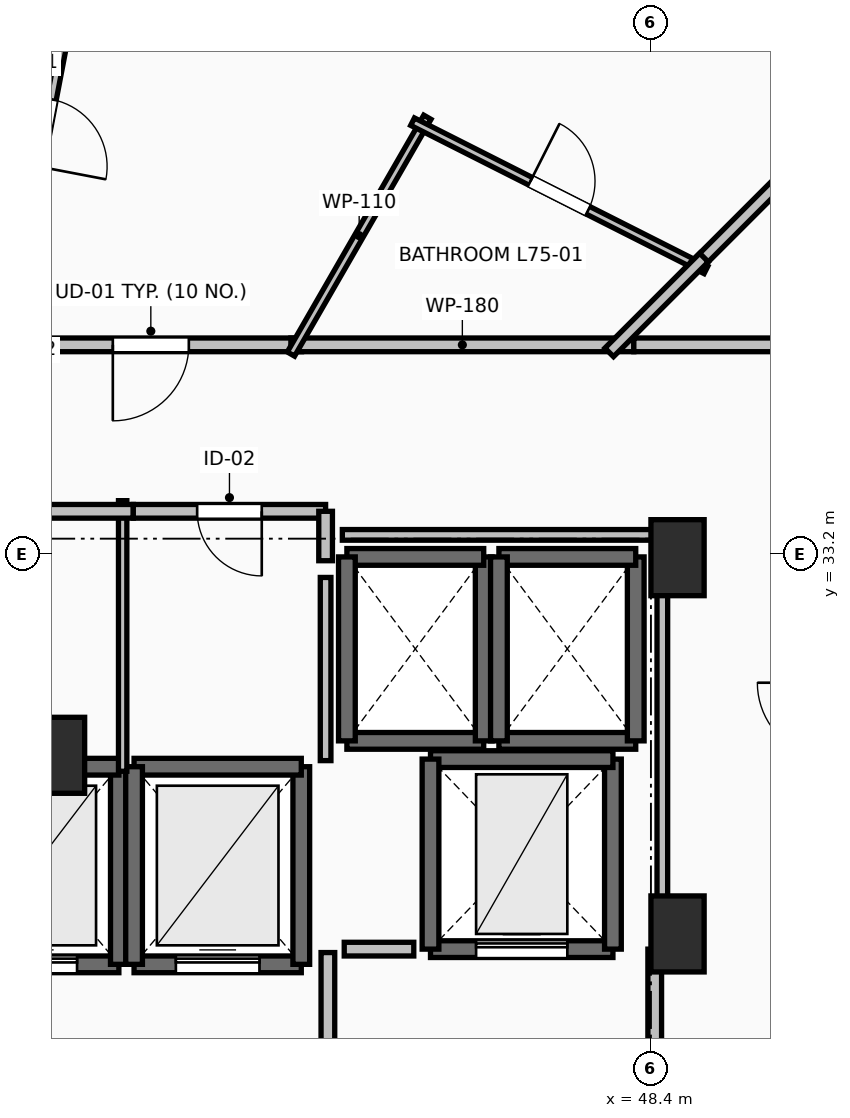
"""IFC4 building model, lengths in metres.
Left out: names, types, materials, properties, quantities, classifications, styles, units other than length and angle.
Written with IfcOpenShell. Run it as: python <this file> out.ifc"""

import sys

from ifc_helpers import new_model, si_unit, direction, frame, frame_2d, origin, origin_2d, place, context, subcontext, project, spatial, rectangle, extrude, element, fill, save


model = new_model("IFC4")
c1 = context("Model", 3, precision=1e-05, world=origin(), true_north=direction((0.0, 1.0)))
c2 = subcontext(c1, "Body", "Model", "MODEL_VIEW")
j1 = project(units=[si_unit("LENGTHUNIT", "METRE"), si_unit("PLANEANGLEUNIT", "RADIAN")], contexts=[c1])
p1 = place(None, origin())
s1 = spatial("IfcSite", under=j1, at=p1, CompositionType="ELEMENT")
p2 = place(p1, origin())
s2 = spatial("IfcBuilding", under=s1, at=p2, CompositionType="ELEMENT")
p3 = place(p2, frame((0.0, 0.0, 276.85)))
s3 = spatial("IfcBuildingStorey", under=s2, at=p3, CompositionType="ELEMENT", Elevation=276.85)
for number, where, z_axis, x_axis in (
    (1, (48.75, 33.15, 0.0), (0.0, 0.0, 1.0), (1.0, 0.0, 0.0)),
    (2, (48.75, 28.2, 0.0), (0.0, 0.0, 1.0), (1.0, 0.0, 0.0)),
    (3, (40.6, 30.55, 0.0), (0.0, 0.0, 1.0), (1.0, 0.0, 0.0)),
):
    element("IfcColumn", number, at=place(p3, frame(where, z_axis=z_axis, x_axis=x_axis)), inside=s3, PredefinedType="PILASTER", context=c2, shape_type="SweptSolid", body=[
        extrude(rectangle(XDim=0.7, YDim=1.0, at=origin_2d()), origin(), (0.0, 0.0, 1.0), 3.55),
    ])
p4 = place(p3, frame((39.2, 27.8, 0.0), z_axis=(0.0, 0.0, 1.0), x_axis=(1.0, 0.0, 0.0)))
e4 = element("IfcWall", 4, at=p4, inside=s3, PredefinedType="SOLIDWALL", context=c2, shape_type="SweptSolid", body=[
    extrude(rectangle(XDim=2.2, YDim=0.22, at=frame_2d((1.1, 0.0))), origin(), (0.0, 0.0, 1.0), 3.19),
])
p5 = place(p4, frame((0.55, 0.0, 0.0)))
e5 = element("IfcOpeningElement", 5, at=p5, cuts=e4, PredefinedType="OPENING", context=c2, shape_type="SweptSolid", body=[
    extrude(rectangle(XDim=1.1, YDim=2.2, at=frame_2d((0.55, 1.1))), frame((0.0, 0.125, 0.0), z_axis=(0.0, -1.0, 0.0), x_axis=(1.0, 0.0, 0.0)), (0.0, 0.0, 1.0), 0.25),
])
p6 = place(p3, frame((41.4, 27.8, 0.0), z_axis=(0.0, 0.0, 1.0), x_axis=(0.0, 1.0, 0.0)))
e6 = element("IfcWall", 6, at=p6, inside=s3, PredefinedType="SOLIDWALL", context=c2, shape_type="SweptSolid", body=[
    extrude(rectangle(XDim=2.6, YDim=0.22, at=frame_2d((1.3, 0.0))), origin(), (0.0, 0.0, 1.0), 3.19),
])
p7 = place(p3, frame((41.4, 30.4, 0.0), z_axis=(0.0, 0.0, 1.0), x_axis=(-1.0, 0.0, 0.0)))
e7 = element("IfcWall", 7, at=p7, inside=s3, PredefinedType="SOLIDWALL", context=c2, shape_type="SweptSolid", body=[
    extrude(rectangle(XDim=2.2, YDim=0.22, at=frame_2d((1.1, 0.0))), origin(), (0.0, 0.0, 1.0), 3.19),
])
p8 = place(p3, frame((41.6, 27.8, 0.0), z_axis=(0.0, 0.0, 1.0), x_axis=(1.0, 0.0, 0.0)))
e8 = element("IfcWall", 8, at=p8, inside=s3, PredefinedType="SOLIDWALL", context=c2, shape_type="SweptSolid", body=[
    extrude(rectangle(XDim=2.2, YDim=0.22, at=frame_2d((1.1, 0.0))), origin(), (0.0, 0.0, 1.0), 3.19),
])
p9 = place(p8, frame((0.55, 0.0, 0.0)))
e9 = element("IfcOpeningElement", 9, at=p9, cuts=e8, PredefinedType="OPENING", context=c2, shape_type="SweptSolid", body=[
    extrude(rectangle(XDim=1.1, YDim=2.2, at=frame_2d((0.55, 1.1))), frame((0.0, 0.125, 0.0), z_axis=(0.0, -1.0, 0.0), x_axis=(1.0, 0.0, 0.0)), (0.0, 0.0, 1.0), 0.25),
])
p10 = place(p3, frame((43.8, 27.8, 0.0), z_axis=(0.0, 0.0, 1.0), x_axis=(0.0, 1.0, 0.0)))
e10 = element("IfcWall", 10, at=p10, inside=s3, PredefinedType="SOLIDWALL", context=c2, shape_type="SweptSolid", body=[
    extrude(rectangle(XDim=2.6, YDim=0.22, at=frame_2d((1.3, 0.0))), origin(), (0.0, 0.0, 1.0), 3.19),
])
p11 = place(p3, frame((43.8, 30.4, 0.0), z_axis=(0.0, 0.0, 1.0), x_axis=(-1.0, 0.0, 0.0)))
e11 = element("IfcWall", 11, at=p11, inside=s3, PredefinedType="SOLIDWALL", context=c2, shape_type="SweptSolid", body=[
    extrude(rectangle(XDim=2.2, YDim=0.22, at=frame_2d((1.1, 0.0))), origin(), (0.0, 0.0, 1.0), 3.19),
])
p12 = place(p3, frame((41.6, 30.4, 0.0), z_axis=(0.0, 0.0, 1.0), x_axis=(0.0, -1.0, 0.0)))
e12 = element("IfcWall", 12, at=p12, inside=s3, PredefinedType="SOLIDWALL", context=c2, shape_type="SweptSolid", body=[
    extrude(rectangle(XDim=2.6, YDim=0.22, at=frame_2d((1.3, 0.0))), origin(), (0.0, 0.0, 1.0), 3.19),
])
p13 = place(p3, frame((44.4, 30.74, 0.0), z_axis=(0.0, 0.0, 1.0), x_axis=(1.0, 0.0, 0.0)))
e13 = element("IfcWall", 13, at=p13, inside=s3, PredefinedType="SOLIDWALL", context=c2, shape_type="SweptSolid", body=[
    extrude(rectangle(XDim=1.8, YDim=0.22, at=frame_2d((0.9, 0.0))), origin(), (0.0, 0.0, 1.0), 3.19),
])
p14 = place(p3, frame((46.2, 30.74, 0.0), z_axis=(0.0, 0.0, 1.0), x_axis=(0.0, 1.0, 0.0)))
e14 = element("IfcWall", 14, at=p14, inside=s3, PredefinedType="SOLIDWALL", context=c2, shape_type="SweptSolid", body=[
    extrude(rectangle(XDim=2.42, YDim=0.22, at=frame_2d((1.21, 0.0))), origin(), (0.0, 0.0, 1.0), 3.19),
])
p15 = place(p3, frame((46.2, 33.16, 0.0), z_axis=(0.0, 0.0, 1.0), x_axis=(-1.0, 0.0, 0.0)))
e15 = element("IfcWall", 15, at=p15, inside=s3, PredefinedType="SOLIDWALL", context=c2, shape_type="SweptSolid", body=[
    extrude(rectangle(XDim=1.8, YDim=0.22, at=frame_2d((0.9, 0.0))), origin(), (0.0, 0.0, 1.0), 3.19),
])
p16 = place(p3, frame((44.4, 33.16, 0.0), z_axis=(0.0, 0.0, 1.0), x_axis=(0.0, -1.0, 0.0)))
e16 = element("IfcWall", 16, at=p16, inside=s3, PredefinedType="SOLIDWALL", context=c2, shape_type="SweptSolid", body=[
    extrude(rectangle(XDim=2.42, YDim=0.22, at=frame_2d((1.21, 0.0))), origin(), (0.0, 0.0, 1.0), 3.19),
])
p17 = place(p3, frame((46.4, 30.74, 0.0), z_axis=(0.0, 0.0, 1.0), x_axis=(1.0, 0.0, 0.0)))
e17 = element("IfcWall", 17, at=p17, inside=s3, PredefinedType="SOLIDWALL", context=c2, shape_type="SweptSolid", body=[
    extrude(rectangle(XDim=1.8, YDim=0.22, at=frame_2d((0.9, 0.0))), origin(), (0.0, 0.0, 1.0), 3.19),
])
p18 = place(p3, frame((48.2, 30.74, 0.0), z_axis=(0.0, 0.0, 1.0), x_axis=(0.0, 1.0, 0.0)))
e18 = element("IfcWall", 18, at=p18, inside=s3, PredefinedType="SOLIDWALL", context=c2, shape_type="SweptSolid", body=[
    extrude(rectangle(XDim=2.42, YDim=0.22, at=frame_2d((1.21, 0.0))), origin(), (0.0, 0.0, 1.0), 3.19),
])
p19 = place(p3, frame((48.2, 33.16, 0.0), z_axis=(0.0, 0.0, 1.0), x_axis=(-1.0, 0.0, 0.0)))
e19 = element("IfcWall", 19, at=p19, inside=s3, PredefinedType="SOLIDWALL", context=c2, shape_type="SweptSolid", body=[
    extrude(rectangle(XDim=1.8, YDim=0.22, at=frame_2d((0.9, 0.0))), origin(), (0.0, 0.0, 1.0), 3.19),
])
p20 = place(p3, frame((46.4, 33.16, 0.0), z_axis=(0.0, 0.0, 1.0), x_axis=(0.0, -1.0, 0.0)))
e20 = element("IfcWall", 20, at=p20, inside=s3, PredefinedType="SOLIDWALL", context=c2, shape_type="SweptSolid", body=[
    extrude(rectangle(XDim=2.42, YDim=0.22, at=frame_2d((1.21, 0.0))), origin(), (0.0, 0.0, 1.0), 3.19),
])
p21 = place(p3, frame((45.5, 28.0, 0.0), z_axis=(0.0, 0.0, 1.0), x_axis=(1.0, 0.0, 0.0)))
e21 = element("IfcWall", 21, at=p21, inside=s3, PredefinedType="SHEAR", context=c2, shape_type="SweptSolid", body=[
    extrude(rectangle(XDim=2.4, YDim=0.22, at=frame_2d((1.2, 0.0))), origin(), (0.0, 0.0, 1.0), 3.19),
])
p22 = place(p21, frame((0.6, 0.0, 0.0)))
e22 = element("IfcOpeningElement", 22, at=p22, cuts=e21, PredefinedType="OPENING", context=c2, shape_type="SweptSolid", body=[
    extrude(rectangle(XDim=1.2, YDim=2.2, at=frame_2d((0.6, 1.1))), frame((0.0, 0.125, 0.0), z_axis=(0.0, -1.0, 0.0), x_axis=(1.0, 0.0, 0.0)), (0.0, 0.0, 1.0), 0.25),
])
p23 = place(p3, frame((47.9, 28.0, 0.0), z_axis=(0.0, 0.0, 1.0), x_axis=(0.0, 1.0, 0.0)))
e23 = element("IfcWall", 23, at=p23, inside=s3, PredefinedType="SHEAR", context=c2, shape_type="SweptSolid", body=[
    extrude(rectangle(XDim=2.5, YDim=0.22, at=frame_2d((1.25, 0.0))), origin(), (0.0, 0.0, 1.0), 3.19),
])
p24 = place(p3, frame((47.9, 30.5, 0.0), z_axis=(0.0, 0.0, 1.0), x_axis=(-1.0, 0.0, 0.0)))
e24 = element("IfcWall", 24, at=p24, inside=s3, PredefinedType="SHEAR", context=c2, shape_type="SweptSolid", body=[
    extrude(rectangle(XDim=2.4, YDim=0.22, at=frame_2d((1.2, 0.0))), origin(), (0.0, 0.0, 1.0), 3.19),
])
p25 = place(p3, frame((45.5, 30.5, 0.0), z_axis=(0.0, 0.0, 1.0), x_axis=(0.0, -1.0, 0.0)))
e25 = element("IfcWall", 25, at=p25, inside=s3, PredefinedType="SHEAR", context=c2, shape_type="SweptSolid", body=[
    extrude(rectangle(XDim=2.5, YDim=0.22, at=frame_2d((1.25, 0.0))), origin(), (0.0, 0.0, 1.0), 3.19),
])
p26 = place(p3, frame((44.15, 27.955, 0.0), z_axis=(0.0, 0.0, 1.0), x_axis=(0.0, -1.0, 0.0)))
e26 = element("IfcWall", 26, at=p26, inside=s3, PredefinedType="PARTITIONING", context=c2, shape_type="SweptSolid", body=[
    extrude(rectangle(XDim=3.91, YDim=0.18, at=frame_2d((1.955, 0.0))), origin(), (0.0, 0.0, 1.0), 3.19),
])
p27 = place(p26, frame((1.355, 0.0, 0.0)))
e27 = element("IfcOpeningElement", 27, at=p27, cuts=e26, PredefinedType="OPENING", context=c2, shape_type="SweptSolid", body=[
    extrude(rectangle(XDim=1.2, YDim=2.15, at=frame_2d((0.6, 1.075))), frame((0.0, 0.105, 0.0), z_axis=(0.0, -1.0, 0.0), x_axis=(1.0, 0.0, 0.0)), (0.0, 0.0, 1.0), 0.21),
])
p28 = place(p3, frame((48.45, 23.95, 0.0), z_axis=(0.0, 0.0, 1.0), x_axis=(0.0, 1.0, 0.0)))
e28 = element("IfcWall", 28, at=p28, inside=s3, PredefinedType="PARTITIONING", context=c2, shape_type="SweptSolid", body=[
    extrude(rectangle(XDim=4.05, YDim=0.18, at=frame_2d((2.025, 0.0))), origin(), (0.0, 0.0, 1.0), 3.19),
])
p29 = place(p28, frame((1.425, 0.0, 0.0)))
e29 = element("IfcOpeningElement", 29, at=p29, cuts=e28, PredefinedType="OPENING", context=c2, shape_type="SweptSolid", body=[
    extrude(rectangle(XDim=1.2, YDim=2.15, at=frame_2d((0.6, 1.075))), frame((0.0, 0.105, 0.0), z_axis=(0.0, -1.0, 0.0), x_axis=(1.0, 0.0, 0.0)), (0.0, 0.0, 1.0), 0.21),
])
p30 = place(p3, frame((41.45, 30.34, 0.0), z_axis=(0.0, 0.0, 1.0), x_axis=(0.0, 1.0, 0.0)))
e30 = element("IfcWall", 30, at=p30, inside=s3, PredefinedType="PARTITIONING", context=c2, shape_type="SweptSolid", body=[
    extrude(rectangle(XDim=3.56, YDim=0.11, at=frame_2d((1.78, 0.0))), origin(), (0.0, 0.0, 1.0), 3.19),
])
p31 = place(p3, frame((41.59, 33.76, 0.0), z_axis=(0.0, 0.0, 1.0), x_axis=(-1.0, 0.0, 0.0)))
e31 = element("IfcWall", 31, at=p31, inside=s3, PredefinedType="PARTITIONING", context=c2, shape_type="SweptSolid", body=[
    extrude(rectangle(XDim=3.44, YDim=0.18, at=frame_2d((1.72, 0.0))), origin(), (0.0, 0.0, 1.0), 3.19),
])
p32 = place(p31, frame((1.295, 0.0, 0.0)))
e32 = element("IfcOpeningElement", 32, at=p32, cuts=e31, PredefinedType="OPENING", context=c2, shape_type="SweptSolid", body=[
    extrude(rectangle(XDim=0.85, YDim=2.1, at=frame_2d((0.425, 1.05))), frame((0.0, 0.105, 0.0), z_axis=(0.0, -1.0, 0.0), x_axis=(1.0, 0.0, 0.0)), (0.0, 0.0, 1.0), 0.21),
])
p33 = place(p3, frame((44.12, 33.76, 0.0), z_axis=(0.0, 0.0, 1.0), x_axis=(-1.0, 0.0, 0.0)))
e33 = element("IfcWall", 33, at=p33, inside=s3, PredefinedType="PARTITIONING", context=c2, shape_type="SweptSolid", body=[
    extrude(rectangle(XDim=2.53, YDim=0.18, at=frame_2d((1.265, 0.0))), origin(), (0.0, 0.0, 1.0), 3.19),
])
p34 = place(p33, frame((0.84, 0.0, 0.0)))
e34 = element("IfcOpeningElement", 34, at=p34, cuts=e33, PredefinedType="OPENING", context=c2, shape_type="SweptSolid", body=[
    extrude(rectangle(XDim=0.85, YDim=2.1, at=frame_2d((0.425, 1.05))), frame((0.0, 0.105, 0.0), z_axis=(0.0, -1.0, 0.0), x_axis=(1.0, 0.0, 0.0)), (0.0, 0.0, 1.0), 0.21),
])
p35 = place(p3, frame((44.12, 33.11, 0.0), z_axis=(0.0, 0.0, 1.0), x_axis=(0.0, 1.0, 0.0)))
e35 = element("IfcWall", 35, at=p35, inside=s3, PredefinedType="PARTITIONING", context=c2, shape_type="SweptSolid", body=[
    extrude(rectangle(XDim=0.65, YDim=0.18, at=frame_2d((0.325, 0.0))), origin(), (0.0, 0.0, 1.0), 3.19),
])
p36 = place(p3, frame((43.803, 35.95, 0.0), z_axis=(0.0, 0.0, 1.0), x_axis=(-1.0, 0.0, 0.0)))
e36 = element("IfcWall", 36, at=p36, inside=s3, PredefinedType="PARTITIONING", context=c2, shape_type="SweptSolid", body=[
    extrude(rectangle(XDim=3.965, YDim=0.18, at=frame_2d((1.982, 0.0))), origin(), (0.0, 0.0, 1.0), 3.19),
])
p37 = place(p36, frame((1.482, 0.0, 0.0)))
e37 = element("IfcOpeningElement", 37, at=p37, cuts=e36, PredefinedType="OPENING", context=c2, shape_type="SweptSolid", body=[
    extrude(rectangle(XDim=1.0, YDim=2.15, at=frame_2d((0.5, 1.075))), frame((0.0, 0.105, 0.0), z_axis=(0.0, -1.0, 0.0), x_axis=(1.0, 0.0, 0.0)), (0.0, 0.0, 1.0), 0.21),
])
p38 = place(p3, frame((48.175, 35.95, 0.0), z_axis=(0.0, 0.0, 1.0), x_axis=(-1.0, 0.0, 0.0)))
e38 = element("IfcWall", 38, at=p38, inside=s3, PredefinedType="PARTITIONING", context=c2, shape_type="SweptSolid", body=[
    extrude(rectangle(XDim=4.512, YDim=0.18, at=frame_2d((2.256, 0.0))), origin(), (0.0, 0.0, 1.0), 2.382),
])
p39 = place(p3, frame((50.8, 35.95, 0.0), z_axis=(0.0, 0.0, 1.0), x_axis=(-1.0, 0.0, 0.0)))
e39 = element("IfcWall", 39, at=p39, inside=s3, PredefinedType="PARTITIONING", context=c2, shape_type="SweptSolid", body=[
    extrude(rectangle(XDim=2.625, YDim=0.18, at=frame_2d((1.312, 0.0))), origin(), (0.0, 0.0, 1.0), 2.382),
])
p40 = place(p3, frame((43.664, 35.829, 0.0), z_axis=(0.0, 0.0, 1.0), x_axis=(0.49917767271, 0.866499654396, 0.0)))
e40 = element("IfcWall", 40, at=p40, inside=s3, PredefinedType="PARTITIONING", context=c2, shape_type="SweptSolid", body=[
    extrude(rectangle(XDim=3.596, YDim=0.11, at=frame_2d((1.798, 0.0))), origin(), (0.0, 0.0, 1.0), 3.19),
])
p41 = place(p3, frame((45.264, 38.886, 0.0), z_axis=(0.0, 0.0, 1.0), x_axis=(0.892556527512, -0.450935522216, 0.0)))
e41 = element("IfcWall", 41, at=p41, inside=s3, PredefinedType="PARTITIONING", context=c2, shape_type="SweptSolid", body=[
    extrude(rectangle(XDim=4.325, YDim=0.11, at=frame_2d((2.162, 0.0))), origin(), (0.0, 0.0, 1.0), 2.382),
])
p42 = place(p41, frame((1.737, 0.0, 0.0)))
e42 = element("IfcOpeningElement", 42, at=p42, cuts=e41, PredefinedType="OPENING", context=c2, shape_type="SweptSolid", body=[
    extrude(rectangle(XDim=0.85, YDim=2.1, at=frame_2d((0.425, 1.05))), frame((0.0, 0.07, 0.0), z_axis=(0.0, -1.0, 0.0), x_axis=(1.0, 0.0, 0.0)), (0.0, 0.0, 1.0), 0.14),
])
p43 = place(p3, frame((40.962, 41.526, 0.0), z_axis=(0.0, 0.0, 1.0), x_axis=(-0.18743226397, -0.982277530244, 0.0)))
e43 = element("IfcWall", 43, at=p43, inside=s3, PredefinedType="PARTITIONING", context=c2, shape_type="SweptSolid", body=[
    extrude(rectangle(XDim=5.677, YDim=0.125, at=frame_2d((2.838, 0.0))), origin(), (0.0, 0.0, 1.0), 3.19),
])
p44 = place(p43, frame((2.388, 0.0, 0.0)))
e44 = element("IfcOpeningElement", 44, at=p44, cuts=e43, PredefinedType="OPENING", context=c2, shape_type="SweptSolid", body=[
    extrude(rectangle(XDim=0.9, YDim=2.1, at=frame_2d((0.45, 1.05))), frame((0.0, 0.077, 0.0), z_axis=(0.0, -1.0, 0.0), x_axis=(1.0, 0.0, 0.0)), (0.0, 0.0, 1.0), 0.155),
])
p45 = place(p3, frame((48.999, 36.999, 0.0), z_axis=(0.0, 0.0, 1.0), x_axis=(0.707106781187, 0.707106781187, 0.0)))
e45 = element("IfcWall", 45, at=p45, inside=s3, PredefinedType="PARTITIONING", context=c2, shape_type="SweptSolid", body=[
    extrude(rectangle(XDim=6.701, YDim=0.16, at=frame_2d((3.35, 0.0))), origin(), (0.0, 0.0, 1.0), 2.774),
])
p46 = place(p3, frame((47.851, 35.851, 0.0), z_axis=(0.0, 0.0, 1.0), x_axis=(0.707106781187, 0.707106781187, 0.0)))
e46 = element("IfcWall", 46, at=p46, inside=s3, PredefinedType="PARTITIONING", context=c2, shape_type="SweptSolid", body=[
    extrude(rectangle(XDim=1.763, YDim=0.16, at=frame_2d((0.882, 0.0))), origin(), (0.0, 0.0, 1.0), 2.382),
])
p47 = place(p3, frame((45.28, 28.0, 0.0), z_axis=(0.0, 0.0, 1.0), x_axis=(-1.0, 0.0, 0.0)))
e47 = element("IfcWall", 47, at=p47, inside=s3, PredefinedType="PARTITIONING", context=c2, shape_type="SweptSolid", body=[
    extrude(rectangle(XDim=0.915, YDim=0.18, at=frame_2d((0.458, 0.0))), origin(), (0.0, 0.0, 1.0), 3.19),
])
p48 = place(p3, frame((44.12, 30.48, 0.0), z_axis=(0.0, 0.0, 1.0), x_axis=(0.0, 1.0, 0.0)))
e48 = element("IfcWall", 48, at=p48, inside=s3, PredefinedType="PARTITIONING", context=c2, shape_type="SweptSolid", body=[
    extrude(rectangle(XDim=2.41, YDim=0.14, at=frame_2d((1.205, 0.0))), origin(), (0.0, 0.0, 1.0), 3.19),
])
p49 = place(p3, frame((48.55, 28.196, 0.0), z_axis=(0.0, 0.0, 1.0), x_axis=(0.0, 1.0, 0.0)))
e49 = element("IfcWall", 49, at=p49, inside=s3, PredefinedType="PARTITIONING", context=c2, shape_type="SweptSolid", body=[
    extrude(rectangle(XDim=5.254, YDim=0.14, at=frame_2d((2.627, 0.0))), origin(), (0.0, 0.0, 1.0), 2.382),
])
p50 = place(p3, frame((48.55, 33.45, 0.0), z_axis=(0.0, 0.0, 1.0), x_axis=(-1.0, 0.0, 0.0)))
e50 = element("IfcWall", 50, at=p50, inside=s3, PredefinedType="PARTITIONING", context=c2, shape_type="SweptSolid", body=[
    extrude(rectangle(XDim=4.21, YDim=0.14, at=frame_2d((2.105, 0.0))), origin(), (0.0, 0.0, 1.0), 2.382),
])
p51 = place(p5, origin())
e51 = element("IfcDoor", 51, at=p51, inside=s3, OperationType="SLIDING_TO_LEFT", PredefinedType="DOOR", context=c2, shape_type="SweptSolid", body=[
    extrude(rectangle(XDim=1.1, YDim=2.2, at=frame_2d((0.55, 1.1))), frame((0.0, 0.025, 0.0), z_axis=(0.0, -1.0, 0.0), x_axis=(1.0, 0.0, 0.0)), (0.0, 0.0, 1.0), 0.05),
])
fill(e5, e51)
p52 = place(p9, origin())
e52 = element("IfcDoor", 52, at=p52, inside=s3, OperationType="SLIDING_TO_LEFT", PredefinedType="DOOR", context=c2, shape_type="SweptSolid", body=[
    extrude(rectangle(XDim=1.1, YDim=2.2, at=frame_2d((0.55, 1.1))), frame((0.0, 0.025, 0.0), z_axis=(0.0, -1.0, 0.0), x_axis=(1.0, 0.0, 0.0)), (0.0, 0.0, 1.0), 0.05),
])
fill(e9, e52)
p53 = place(p22, origin())
e53 = element("IfcDoor", 53, at=p53, inside=s3, OperationType="SLIDING_TO_LEFT", PredefinedType="DOOR", context=c2, shape_type="SweptSolid", body=[
    extrude(rectangle(XDim=1.2, YDim=2.2, at=frame_2d((0.6, 1.1))), frame((0.0, 0.025, 0.0), z_axis=(0.0, -1.0, 0.0), x_axis=(1.0, 0.0, 0.0)), (0.0, 0.0, 1.0), 0.05),
])
fill(e22, e53)
p54 = place(p34, origin())
e54 = element("IfcDoor", 54, at=p54, inside=s3, OperationType="SINGLE_SWING_LEFT", PredefinedType="DOOR", context=c2, shape_type="SweptSolid", body=[
    extrude(rectangle(XDim=0.85, YDim=2.1, at=frame_2d((0.425, 1.05))), frame((0.0, 0.025, 0.0), z_axis=(0.0, -1.0, 0.0), x_axis=(1.0, 0.0, 0.0)), (0.0, 0.0, 1.0), 0.05),
])
fill(e34, e54)
p55 = place(p37, origin())
e55 = element("IfcDoor", 55, at=p55, inside=s3, OperationType="SINGLE_SWING_RIGHT", PredefinedType="DOOR", context=c2, shape_type="SweptSolid", body=[
    extrude(rectangle(XDim=1.0, YDim=2.15, at=frame_2d((0.5, 1.075))), frame((0.0, 0.025, 0.0), z_axis=(0.0, -1.0, 0.0), x_axis=(1.0, 0.0, 0.0)), (0.0, 0.0, 1.0), 0.05),
])
fill(e37, e55)
p56 = place(p42, origin())
e56 = element("IfcDoor", 56, at=p56, inside=s3, OperationType="SINGLE_SWING_LEFT", PredefinedType="DOOR", context=c2, shape_type="SweptSolid", body=[
    extrude(rectangle(XDim=0.85, YDim=2.1, at=frame_2d((0.425, 1.05))), frame((0.0, 0.025, 0.0), z_axis=(0.0, -1.0, 0.0), x_axis=(1.0, 0.0, 0.0)), (0.0, 0.0, 1.0), 0.05),
])
fill(e42, e56)
p57 = place(p44, origin())
e57 = element("IfcDoor", 57, at=p57, inside=s3, OperationType="SINGLE_SWING_RIGHT", PredefinedType="DOOR", context=c2, shape_type="SweptSolid", body=[
    extrude(rectangle(XDim=0.9, YDim=2.1, at=frame_2d((0.45, 1.05))), frame((0.0, 0.025, 0.0), z_axis=(0.0, -1.0, 0.0), x_axis=(1.0, 0.0, 0.0)), (0.0, 0.0, 1.0), 0.05),
])
fill(e44, e57)
save(model, sys.argv[1])
